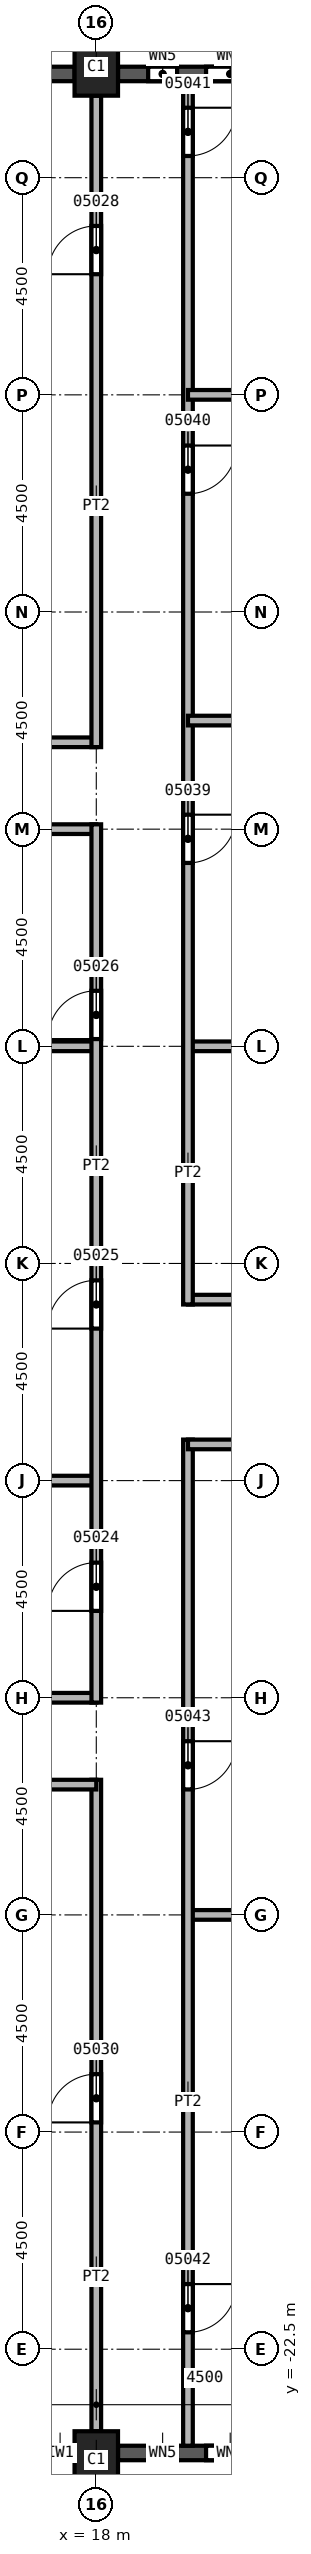
"""IFC4 building model, lengths in metres.
Left out: names, types, materials, properties, quantities, classifications, styles, units other than length and angle.
Written with IfcOpenShell. Run it as: python <this file> out.ifc"""

import sys

from ifc_helpers import new_model, si_unit, direction, frame, frame_2d, origin, origin_2d, place, context, subcontext, project, spatial, rectangle, extrude, element, fill, save


model = new_model("IFC4")
c1 = context("Model", 3, precision=1e-05, world=origin(), true_north=direction((0.0, 1.0)))
c2 = subcontext(c1, "Body", "Model", "MODEL_VIEW")
j1 = project(units=[si_unit("LENGTHUNIT", "METRE"), si_unit("PLANEANGLEUNIT", "RADIAN")], contexts=[c1])
p1 = place(None, origin())
s1 = spatial("IfcSite", under=j1, at=p1, CompositionType="ELEMENT")
p2 = place(p1, origin())
s2 = spatial("IfcBuilding", under=s1, at=p2, CompositionType="ELEMENT")
p3 = place(p2, frame((0.0, 0.0, 116.0)))
s3 = spatial("IfcBuildingStorey", under=s2, at=p3, CompositionType="ELEMENT", Elevation=116.0)
for number, where, z_axis, x_axis in (
    (1, (18.0, 24.8, 0.0), (0.0, 0.0, 1.0), (1.0, 0.0, 0.0)),
    (2, (18.0, -24.8, 0.0), (0.0, 0.0, 1.0), (1.0, 0.0, 0.0)),
):
    element("IfcColumn", number, at=place(p3, frame(where, z_axis=z_axis, x_axis=x_axis)), inside=s3, PredefinedType="COLUMN", context=c2, shape_type="SweptSolid", body=[
        extrude(rectangle(XDim=0.9, YDim=1.2, at=origin_2d()), origin(), (0.0, 0.0, 1.0), 3.6),
    ])
p4 = place(p3, frame((13.95, -24.65, 0.0), z_axis=(0.0, 0.0, 1.0), x_axis=(1.0, 0.0, 0.0)))
e3 = element("IfcWall", 3, at=p4, inside=s3, PredefinedType="SOLIDWALL", context=c2, shape_type="SweptSolid", body=[
    extrude(rectangle(XDim=3.6, YDim=0.3, at=frame_2d((1.8, 0.0))), origin(), (0.0, 0.0, 1.0), 3.0),
])
p5 = place(p4, frame((0.6, 0.0, 0.8)))
e4 = element("IfcOpeningElement", 4, at=p5, cuts=e3, PredefinedType="OPENING", context=c2, shape_type="SweptSolid", body=[
    extrude(rectangle(XDim=2.4, YDim=1.95, at=frame_2d((1.2, 0.975))), frame((0.0, 0.15, 0.0), z_axis=(0.0, -1.0, 0.0), x_axis=(1.0, 0.0, 0.0)), (0.0, 0.0, 1.0), 0.3),
])
p6 = place(p3, frame((18.45, -24.65, 0.0), z_axis=(0.0, 0.0, 1.0), x_axis=(1.0, 0.0, 0.0)))
e5 = element("IfcWall", 5, at=p6, inside=s3, PredefinedType="SOLIDWALL", context=c2, shape_type="SweptSolid", body=[
    extrude(rectangle(XDim=3.6, YDim=0.3, at=frame_2d((1.8, 0.0))), origin(), (0.0, 0.0, 1.0), 3.0),
])
p7 = place(p6, frame((0.625, 0.0, 0.8)))
e6 = element("IfcOpeningElement", 6, at=p7, cuts=e5, PredefinedType="OPENING", context=c2, shape_type="SweptSolid", body=[
    extrude(rectangle(XDim=0.6, YDim=1.95, at=frame_2d((0.3, 0.975))), frame((0.0, 0.15, 0.0), z_axis=(0.0, -1.0, 0.0), x_axis=(1.0, 0.0, 0.0)), (0.0, 0.0, 1.0), 0.3),
])
p8 = place(p6, frame((1.825, 0.0, 0.8)))
e7 = element("IfcOpeningElement", 7, at=p8, cuts=e5, PredefinedType="OPENING", context=c2, shape_type="SweptSolid", body=[
    extrude(rectangle(XDim=1.0, YDim=1.95, at=frame_2d((0.5, 0.975))), frame((0.0, 0.15, 0.0), z_axis=(0.0, -1.0, 0.0), x_axis=(1.0, 0.0, 0.0)), (0.0, 0.0, 1.0), 0.3),
])
p9 = place(p3, frame((22.05, 24.65, 0.0), z_axis=(0.0, 0.0, 1.0), x_axis=(-1.0, 0.0, 0.0)))
e8 = element("IfcWall", 8, at=p9, inside=s3, PredefinedType="SOLIDWALL", context=c2, shape_type="SweptSolid", body=[
    extrude(rectangle(XDim=3.6, YDim=0.3, at=frame_2d((1.8, 0.0))), origin(), (0.0, 0.0, 1.0), 3.0),
])
p10 = place(p9, frame((0.775, 0.0, 0.8)))
e9 = element("IfcOpeningElement", 9, at=p10, cuts=e8, PredefinedType="OPENING", context=c2, shape_type="SweptSolid", body=[
    extrude(rectangle(XDim=1.0, YDim=1.95, at=frame_2d((0.5, 0.975))), frame((0.0, 0.15, 0.0), z_axis=(0.0, -1.0, 0.0), x_axis=(1.0, 0.0, 0.0)), (0.0, 0.0, 1.0), 0.3),
])
p11 = place(p9, frame((2.375, 0.0, 0.8)))
e10 = element("IfcOpeningElement", 10, at=p11, cuts=e8, PredefinedType="OPENING", context=c2, shape_type="SweptSolid", body=[
    extrude(rectangle(XDim=0.6, YDim=1.95, at=frame_2d((0.3, 0.975))), frame((0.0, 0.15, 0.0), z_axis=(0.0, -1.0, 0.0), x_axis=(1.0, 0.0, 0.0)), (0.0, 0.0, 1.0), 0.3),
])
p12 = place(p3, frame((17.55, 24.65, 0.0), z_axis=(0.0, 0.0, 1.0), x_axis=(-1.0, 0.0, 0.0)))
e11 = element("IfcWall", 11, at=p12, inside=s3, PredefinedType="SOLIDWALL", context=c2, shape_type="SweptSolid", body=[
    extrude(rectangle(XDim=3.6, YDim=0.3, at=frame_2d((1.8, 0.0))), origin(), (0.0, 0.0, 1.0), 3.0),
])
p13 = place(p12, frame((0.6, 0.0, 0.8)))
e12 = element("IfcOpeningElement", 12, at=p13, cuts=e11, PredefinedType="OPENING", context=c2, shape_type="SweptSolid", body=[
    extrude(rectangle(XDim=2.4, YDim=1.95, at=frame_2d((1.2, 0.975))), frame((0.0, 0.15, 0.0), z_axis=(0.0, -1.0, 0.0), x_axis=(1.0, 0.0, 0.0)), (0.0, 0.0, 1.0), 0.3),
])
for number, where, z_axis, x_axis in (
    (13, (13.5, -9.0, 0.0), (0.0, 0.0, 1.0), (1.0, 0.0, 0.0)),
    (14, (13.5, -4.5, 0.0), (0.0, 0.0, 1.0), (1.0, 0.0, 0.0)),
    (15, (13.5, 4.5, 0.0), (0.0, 0.0, 1.0), (1.0, 0.0, 0.0)),
    (16, (18.0, 9.0, 0.0), (0.0, 0.0, 1.0), (-1.0, 0.0, 0.0)),
):
    element("IfcWall", number, at=place(p3, frame(where, z_axis=z_axis, x_axis=x_axis)), inside=s3, PredefinedType="PARTITIONING", context=c2, shape_type="SweptSolid", body=[
        extrude(rectangle(XDim=4.5, YDim=0.2, at=frame_2d((2.25, 0.0))), origin(), (0.0, 0.0, 1.0), 3.6),
    ])
p14 = place(p3, frame((14.4, 10.8, 0.0), z_axis=(0.0, 0.0, 1.0), x_axis=(1.0, 0.0, 0.0)))
e17 = element("IfcWall", 17, at=p14, inside=s3, PredefinedType="PARTITIONING", context=c2, shape_type="SweptSolid", body=[
    extrude(rectangle(XDim=3.6, YDim=0.2, at=frame_2d((1.8, 0.0))), origin(), (0.0, 0.0, 1.0), 3.6),
])
p15 = place(p3, frame((18.0, -24.2, 0.0), z_axis=(0.0, 0.0, 1.0), x_axis=(0.0, 1.0, 0.0)))
e18 = element("IfcWall", 18, at=p15, inside=s3, PredefinedType="PARTITIONING", context=c2, shape_type="SweptSolid", body=[
    extrude(rectangle(XDim=13.5, YDim=0.2, at=frame_2d((6.75, 0.0))), origin(), (0.0, 0.0, 1.0), 3.6),
])
p16 = place(p15, frame((6.4, 0.0, 0.0)))
e19 = element("IfcOpeningElement", 19, at=p16, cuts=e18, PredefinedType="OPENING", context=c2, shape_type="SweptSolid", body=[
    extrude(rectangle(XDim=1.0, YDim=2.1, at=frame_2d((0.5, 1.05))), frame((0.0, 0.1, 0.0), z_axis=(0.0, -1.0, 0.0), x_axis=(1.0, 0.0, 0.0)), (0.0, 0.0, 1.0), 0.2),
])
p17 = place(p3, frame((18.0, -10.8, 0.0), z_axis=(0.0, 0.0, 1.0), x_axis=(-1.0, 0.0, 0.0)))
e20 = element("IfcWall", 20, at=p17, inside=s3, PredefinedType="PARTITIONING", context=c2, shape_type="SweptSolid", body=[
    extrude(rectangle(XDim=3.6, YDim=0.2, at=frame_2d((1.8, 0.0))), origin(), (0.0, 0.0, 1.0), 3.6),
])
p18 = place(p3, frame((18.0, -9.1, 0.0), z_axis=(0.0, 0.0, 1.0), x_axis=(0.0, 1.0, 0.0)))
e21 = element("IfcWall", 21, at=p18, inside=s3, PredefinedType="PARTITIONING", context=c2, shape_type="SweptSolid", body=[
    extrude(rectangle(XDim=18.2, YDim=0.2, at=frame_2d((9.1, 0.0))), origin(), (0.0, 0.0, 1.0), 3.6),
])
p19 = place(p18, frame((1.9, 0.0, 0.0)))
e22 = element("IfcOpeningElement", 22, at=p19, cuts=e21, PredefinedType="OPENING", context=c2, shape_type="SweptSolid", body=[
    extrude(rectangle(XDim=1.0, YDim=2.1, at=frame_2d((0.5, 1.05))), frame((0.0, 0.1, 0.0), z_axis=(0.0, -1.0, 0.0), x_axis=(1.0, 0.0, 0.0)), (0.0, 0.0, 1.0), 0.2),
])
p20 = place(p18, frame((7.75, 0.0, 0.0)))
e23 = element("IfcOpeningElement", 23, at=p20, cuts=e21, PredefinedType="OPENING", context=c2, shape_type="SweptSolid", body=[
    extrude(rectangle(XDim=1.0, YDim=2.1, at=frame_2d((0.5, 1.05))), frame((0.0, 0.1, 0.0), z_axis=(0.0, -1.0, 0.0), x_axis=(1.0, 0.0, 0.0)), (0.0, 0.0, 1.0), 0.2),
])
p21 = place(p18, frame((13.75, 0.0, 0.0)))
e24 = element("IfcOpeningElement", 24, at=p21, cuts=e21, PredefinedType="OPENING", context=c2, shape_type="SweptSolid", body=[
    extrude(rectangle(XDim=1.0, YDim=2.1, at=frame_2d((0.5, 1.05))), frame((0.0, 0.1, 0.0), z_axis=(0.0, -1.0, 0.0), x_axis=(1.0, 0.0, 0.0)), (0.0, 0.0, 1.0), 0.2),
])
p22 = place(p3, frame((18.0, 10.7, 0.0), z_axis=(0.0, 0.0, 1.0), x_axis=(0.0, 1.0, 0.0)))
e25 = element("IfcWall", 25, at=p22, inside=s3, PredefinedType="PARTITIONING", context=c2, shape_type="SweptSolid", body=[
    extrude(rectangle(XDim=13.5, YDim=0.2, at=frame_2d((6.75, 0.0))), origin(), (0.0, 0.0, 1.0), 3.6),
])
p23 = place(p22, frame((9.8, 0.0, 0.0)))
e26 = element("IfcOpeningElement", 26, at=p23, cuts=e25, PredefinedType="OPENING", context=c2, shape_type="SweptSolid", body=[
    extrude(rectangle(XDim=1.0, YDim=2.1, at=frame_2d((0.5, 1.05))), frame((0.0, 0.1, 0.0), z_axis=(0.0, -1.0, 0.0), x_axis=(1.0, 0.0, 0.0)), (0.0, 0.0, 1.0), 0.2),
])
p24 = place(p3, frame((19.9, -13.5, 0.0), z_axis=(0.0, 0.0, 1.0), x_axis=(1.0, 0.0, 0.0)))
e27 = element("IfcWall", 27, at=p24, inside=s3, PredefinedType="PARTITIONING", context=c2, shape_type="SweptSolid", body=[
    extrude(rectangle(XDim=7.2, YDim=0.2, at=frame_2d((3.6, 0.0))), origin(), (0.0, 0.0, 1.0), 3.6),
])
p25 = place(p3, frame((19.9, -3.65, 0.0), z_axis=(0.0, 0.0, 1.0), x_axis=(0.0, -1.0, 0.0)))
e28 = element("IfcWall", 28, at=p25, inside=s3, PredefinedType="PARTITIONING", context=c2, shape_type="SweptSolid", body=[
    extrude(rectangle(XDim=20.85, YDim=0.2, at=frame_2d((10.425, 0.0))), origin(), (0.0, 0.0, 1.0), 3.6),
])
p26 = place(p25, frame((17.5, 0.0, 0.0)))
e29 = element("IfcOpeningElement", 29, at=p26, cuts=e28, PredefinedType="OPENING", context=c2, shape_type="SweptSolid", body=[
    extrude(rectangle(XDim=1.0, YDim=2.1, at=frame_2d((0.5, 1.05))), frame((0.0, 0.1, 0.0), z_axis=(0.0, -1.0, 0.0), x_axis=(1.0, 0.0, 0.0)), (0.0, 0.0, 1.0), 0.2),
])
p27 = place(p25, frame((6.25, 0.0, 0.0)))
e30 = element("IfcOpeningElement", 30, at=p27, cuts=e28, PredefinedType="OPENING", context=c2, shape_type="SweptSolid", body=[
    extrude(rectangle(XDim=1.0, YDim=2.1, at=frame_2d((0.5, 1.05))), frame((0.0, 0.1, 0.0), z_axis=(0.0, -1.0, 0.0), x_axis=(1.0, 0.0, 0.0)), (0.0, 0.0, 1.0), 0.2),
])
p28 = place(p3, frame((19.9, -0.75, 0.0), z_axis=(0.0, 0.0, 1.0), x_axis=(1.0, 0.0, 0.0)))
e31 = element("IfcWall", 31, at=p28, inside=s3, PredefinedType="PARTITIONING", context=c2, shape_type="SweptSolid", body=[
    extrude(rectangle(XDim=13.95, YDim=0.2, at=frame_2d((6.975, 0.0))), origin(), (0.0, 0.0, 1.0), 3.6),
])
p29 = place(p28, frame((3.4, 0.0, 0.0)))
e32 = element("IfcOpeningElement", 32, at=p29, cuts=e31, PredefinedType="OPENING", context=c2, shape_type="SweptSolid", body=[
    extrude(rectangle(XDim=1.0, YDim=2.1, at=frame_2d((0.5, 1.05))), frame((0.0, 0.1, 0.0), z_axis=(0.0, -1.0, 0.0), x_axis=(1.0, 0.0, 0.0)), (0.0, 0.0, 1.0), 0.2),
])
p30 = place(p3, frame((19.9, 4.5, 0.0), z_axis=(0.0, 0.0, 1.0), x_axis=(1.0, 0.0, 0.0)))
e33 = element("IfcWall", 33, at=p30, inside=s3, PredefinedType="PARTITIONING", context=c2, shape_type="SweptSolid", body=[
    extrude(rectangle(XDim=7.2, YDim=0.2, at=frame_2d((3.6, 0.0))), origin(), (0.0, 0.0, 1.0), 3.6),
])
p31 = place(p3, frame((19.9, 24.5, 0.0), z_axis=(0.0, 0.0, 1.0), x_axis=(0.0, -1.0, 0.0)))
e34 = element("IfcWall", 34, at=p31, inside=s3, PredefinedType="PARTITIONING", context=c2, shape_type="SweptSolid", body=[
    extrude(rectangle(XDim=25.35, YDim=0.2, at=frame_2d((12.675, 0.0))), origin(), (0.0, 0.0, 1.0), 3.6),
])
p32 = place(p31, frame((15.2, 0.0, 0.0)))
e35 = element("IfcOpeningElement", 35, at=p32, cuts=e34, PredefinedType="OPENING", context=c2, shape_type="SweptSolid", body=[
    extrude(rectangle(XDim=1.0, YDim=2.1, at=frame_2d((0.5, 1.05))), frame((0.0, 0.1, 0.0), z_axis=(0.0, -1.0, 0.0), x_axis=(1.0, 0.0, 0.0)), (0.0, 0.0, 1.0), 0.2),
])
p33 = place(p31, frame((7.55, 0.0, 0.0)))
e36 = element("IfcOpeningElement", 36, at=p33, cuts=e34, PredefinedType="OPENING", context=c2, shape_type="SweptSolid", body=[
    extrude(rectangle(XDim=1.0, YDim=2.1, at=frame_2d((0.5, 1.05))), frame((0.0, 0.1, 0.0), z_axis=(0.0, -1.0, 0.0), x_axis=(1.0, 0.0, 0.0)), (0.0, 0.0, 1.0), 0.2),
])
p34 = place(p31, frame((0.55, 0.0, 0.0)))
e37 = element("IfcOpeningElement", 37, at=p34, cuts=e34, PredefinedType="OPENING", context=c2, shape_type="SweptSolid", body=[
    extrude(rectangle(XDim=1.0, YDim=2.1, at=frame_2d((0.5, 1.05))), frame((0.0, 0.1, 0.0), z_axis=(0.0, -1.0, 0.0), x_axis=(1.0, 0.0, 0.0)), (0.0, 0.0, 1.0), 0.2),
])
p35 = place(p3, frame((19.9, 11.25, 0.0), z_axis=(0.0, 0.0, 1.0), x_axis=(1.0, 0.0, 0.0)))
e38 = element("IfcWall", 38, at=p35, inside=s3, PredefinedType="PARTITIONING", context=c2, shape_type="SweptSolid", body=[
    extrude(rectangle(XDim=7.2, YDim=0.2, at=frame_2d((3.6, 0.0))), origin(), (0.0, 0.0, 1.0), 3.6),
])
p36 = place(p3, frame((19.9, 18.0, 0.0), z_axis=(0.0, 0.0, 1.0), x_axis=(1.0, 0.0, 0.0)))
e39 = element("IfcWall", 39, at=p36, inside=s3, PredefinedType="PARTITIONING", context=c2, shape_type="SweptSolid", body=[
    extrude(rectangle(XDim=4.25, YDim=0.2, at=frame_2d((2.125, 0.0))), origin(), (0.0, 0.0, 1.0), 3.6),
])
p37 = place(p3, frame((33.85, -3.75, 0.0), z_axis=(0.0, 0.0, 1.0), x_axis=(-1.0, 0.0, 0.0)))
e40 = element("IfcWall", 40, at=p37, inside=s3, PredefinedType="PARTITIONING", context=c2, shape_type="SweptSolid", body=[
    extrude(rectangle(XDim=13.95, YDim=0.2, at=frame_2d((6.975, 0.0))), origin(), (0.0, 0.0, 1.0), 3.6),
])
p38 = place(p19, origin())
e41 = element("IfcDoor", 41, at=p38, inside=s3, OperationType="SINGLE_SWING_LEFT", PredefinedType="DOOR", context=c2, shape_type="SweptSolid", body=[
    extrude(rectangle(XDim=1.0, YDim=2.1, at=frame_2d((0.5, 1.05))), frame((0.0, 0.025, 0.0), z_axis=(0.0, -1.0, 0.0), x_axis=(1.0, 0.0, 0.0)), (0.0, 0.0, 1.0), 0.05),
])
fill(e22, e41)
p39 = place(p20, origin())
e42 = element("IfcDoor", 42, at=p39, inside=s3, OperationType="SINGLE_SWING_RIGHT", PredefinedType="DOOR", context=c2, shape_type="SweptSolid", body=[
    extrude(rectangle(XDim=1.0, YDim=2.1, at=frame_2d((0.5, 1.05))), frame((0.0, 0.025, 0.0), z_axis=(0.0, -1.0, 0.0), x_axis=(1.0, 0.0, 0.0)), (0.0, 0.0, 1.0), 0.05),
])
fill(e23, e42)
p40 = place(p21, origin())
e43 = element("IfcDoor", 43, at=p40, inside=s3, OperationType="SINGLE_SWING_LEFT", PredefinedType="DOOR", context=c2, shape_type="SweptSolid", body=[
    extrude(rectangle(XDim=1.0, YDim=2.1, at=frame_2d((0.5, 1.05))), frame((0.0, 0.025, 0.0), z_axis=(0.0, -1.0, 0.0), x_axis=(1.0, 0.0, 0.0)), (0.0, 0.0, 1.0), 0.05),
])
fill(e24, e43)
p41 = place(p23, origin())
e44 = element("IfcDoor", 44, at=p41, inside=s3, OperationType="SINGLE_SWING_LEFT", PredefinedType="DOOR", context=c2, shape_type="SweptSolid", body=[
    extrude(rectangle(XDim=1.0, YDim=2.1, at=frame_2d((0.5, 1.05))), frame((0.0, 0.025, 0.0), z_axis=(0.0, -1.0, 0.0), x_axis=(1.0, 0.0, 0.0)), (0.0, 0.0, 1.0), 0.05),
])
fill(e26, e44)
p42 = place(p16, origin())
e45 = element("IfcDoor", 45, at=p42, inside=s3, OperationType="SINGLE_SWING_LEFT", PredefinedType="DOOR", context=c2, shape_type="SweptSolid", body=[
    extrude(rectangle(XDim=1.0, YDim=2.1, at=frame_2d((0.5, 1.05))), frame((0.0, 0.025, 0.0), z_axis=(0.0, -1.0, 0.0), x_axis=(1.0, 0.0, 0.0)), (0.0, 0.0, 1.0), 0.05),
])
fill(e19, e45)
p43 = place(p32, origin())
e46 = element("IfcDoor", 46, at=p43, inside=s3, OperationType="SINGLE_SWING_RIGHT", PredefinedType="DOOR", context=c2, shape_type="SweptSolid", body=[
    extrude(rectangle(XDim=1.0, YDim=2.1, at=frame_2d((0.5, 1.05))), frame((0.0, 0.025, 0.0), z_axis=(0.0, -1.0, 0.0), x_axis=(1.0, 0.0, 0.0)), (0.0, 0.0, 1.0), 0.05),
])
fill(e35, e46)
p44 = place(p33, origin())
e47 = element("IfcDoor", 47, at=p44, inside=s3, OperationType="SINGLE_SWING_LEFT", PredefinedType="DOOR", context=c2, shape_type="SweptSolid", body=[
    extrude(rectangle(XDim=1.0, YDim=2.1, at=frame_2d((0.5, 1.05))), frame((0.0, 0.025, 0.0), z_axis=(0.0, -1.0, 0.0), x_axis=(1.0, 0.0, 0.0)), (0.0, 0.0, 1.0), 0.05),
])
fill(e36, e47)
p45 = place(p34, origin())
e48 = element("IfcDoor", 48, at=p45, inside=s3, OperationType="SINGLE_SWING_RIGHT", PredefinedType="DOOR", context=c2, shape_type="SweptSolid", body=[
    extrude(rectangle(XDim=1.0, YDim=2.1, at=frame_2d((0.5, 1.05))), frame((0.0, 0.025, 0.0), z_axis=(0.0, -1.0, 0.0), x_axis=(1.0, 0.0, 0.0)), (0.0, 0.0, 1.0), 0.05),
])
fill(e37, e48)
p46 = place(p26, origin())
e49 = element("IfcDoor", 49, at=p46, inside=s3, OperationType="SINGLE_SWING_LEFT", PredefinedType="DOOR", context=c2, shape_type="SweptSolid", body=[
    extrude(rectangle(XDim=1.0, YDim=2.1, at=frame_2d((0.5, 1.05))), frame((0.0, 0.025, 0.0), z_axis=(0.0, -1.0, 0.0), x_axis=(1.0, 0.0, 0.0)), (0.0, 0.0, 1.0), 0.05),
])
fill(e29, e49)
p47 = place(p27, origin())
e50 = element("IfcDoor", 50, at=p47, inside=s3, OperationType="SINGLE_SWING_RIGHT", PredefinedType="DOOR", context=c2, shape_type="SweptSolid", body=[
    extrude(rectangle(XDim=1.0, YDim=2.1, at=frame_2d((0.5, 1.05))), frame((0.0, 0.025, 0.0), z_axis=(0.0, -1.0, 0.0), x_axis=(1.0, 0.0, 0.0)), (0.0, 0.0, 1.0), 0.05),
])
fill(e30, e50)
p48 = place(p7, origin())
e51 = element("IfcWindow", 51, at=p48, inside=s3, PartitioningType="SINGLE_PANEL", PredefinedType="WINDOW", context=c2, shape_type="SweptSolid", body=[
    extrude(rectangle(XDim=0.6, YDim=1.95, at=frame_2d((0.3, 0.975))), frame((0.0, 0.03, 0.0), z_axis=(0.0, -1.0, 0.0), x_axis=(1.0, 0.0, 0.0)), (0.0, 0.0, 1.0), 0.06),
])
fill(e6, e51)
p49 = place(p8, origin())
e52 = element("IfcWindow", 52, at=p49, inside=s3, PartitioningType="SINGLE_PANEL", PredefinedType="WINDOW", context=c2, shape_type="SweptSolid", body=[
    extrude(rectangle(XDim=1.0, YDim=1.95, at=frame_2d((0.5, 0.975))), frame((0.0, 0.03, 0.0), z_axis=(0.0, -1.0, 0.0), x_axis=(1.0, 0.0, 0.0)), (0.0, 0.0, 1.0), 0.06),
])
fill(e7, e52)
p50 = place(p10, origin())
e53 = element("IfcWindow", 53, at=p50, inside=s3, PartitioningType="SINGLE_PANEL", PredefinedType="WINDOW", context=c2, shape_type="SweptSolid", body=[
    extrude(rectangle(XDim=1.0, YDim=1.95, at=frame_2d((0.5, 0.975))), frame((0.0, 0.03, 0.0), z_axis=(0.0, -1.0, 0.0), x_axis=(1.0, 0.0, 0.0)), (0.0, 0.0, 1.0), 0.06),
])
fill(e9, e53)
p51 = place(p11, origin())
e54 = element("IfcWindow", 54, at=p51, inside=s3, PartitioningType="SINGLE_PANEL", PredefinedType="WINDOW", context=c2, shape_type="SweptSolid", body=[
    extrude(rectangle(XDim=0.6, YDim=1.95, at=frame_2d((0.3, 0.975))), frame((0.0, 0.03, 0.0), z_axis=(0.0, -1.0, 0.0), x_axis=(1.0, 0.0, 0.0)), (0.0, 0.0, 1.0), 0.06),
])
fill(e10, e54)
save(model, sys.argv[1])
